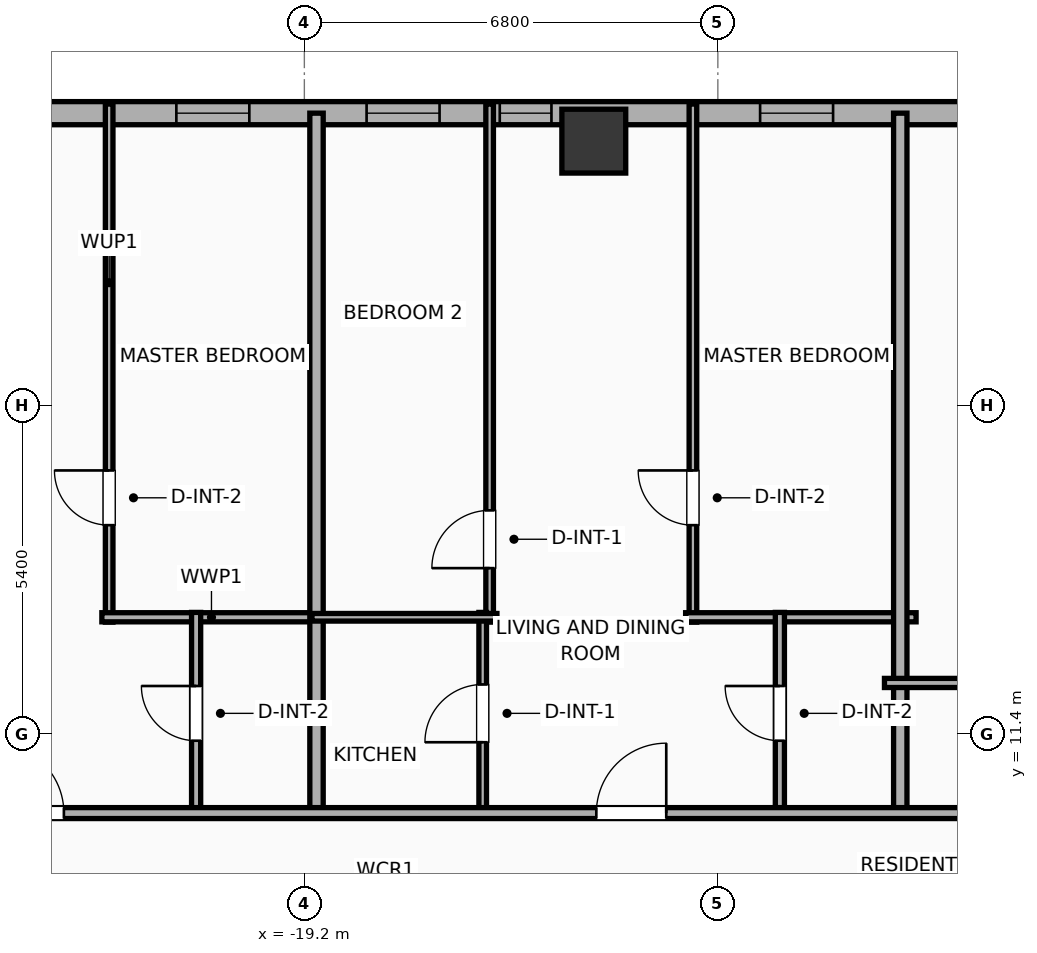
"""IFC4 building model, lengths in metres.
Left out: names, types, materials, properties, quantities, classifications, styles, units other than length and angle.
Written with IfcOpenShell. Run it as: python <this file> out.ifc"""

import sys

from ifc_helpers import new_model, si_unit, direction, frame, frame_2d, origin, origin_2d, place, context, subcontext, project, spatial, rectangle, hollow_rectangle, extrude, element, fill, save


model = new_model("IFC4")
c1 = context("Model", 3, precision=1e-05, world=origin(), true_north=direction((0.0, 1.0)))
c2 = subcontext(c1, "Body", "Model", "MODEL_VIEW")
j1 = project(units=[si_unit("LENGTHUNIT", "METRE"), si_unit("PLANEANGLEUNIT", "RADIAN")], contexts=[c1])
p1 = place(None, origin())
s1 = spatial("IfcSite", under=j1, at=p1, CompositionType="ELEMENT")
p2 = place(p1, origin())
s2 = spatial("IfcBuilding", under=s1, at=p2, CompositionType="ELEMENT")
p3 = place(p2, frame((0.0, 0.0, 97.5)))
s3 = spatial("IfcBuildingStorey", under=s2, at=p3, CompositionType="ELEMENT", Elevation=97.5)
p4 = place(p3, frame((-14.44, 21.15, 0.0), z_axis=(0.0, 0.0, 1.0), x_axis=(1.0, 0.0, 0.0)))
e1 = element("IfcColumn", 1, at=p4, inside=s3, PredefinedType="COLUMN", context=c2, shape_type="SweptSolid", body=[
    extrude(hollow_rectangle(XDim=1.05, YDim=1.05, WallThickness=0.036, at=origin_2d()), origin(), (0.0, 0.0, 1.0), 3.9),
])
p5 = place(p3, frame((-25.381, 21.61, 0.0), z_axis=(0.0, 0.0, 1.0), x_axis=(1.0, 0.0, 0.0)))
e2 = element("IfcWall", 2, at=p5, inside=s3, PredefinedType="ELEMENTEDWALL", context=c2, shape_type="SweptSolid", body=[
    extrude(rectangle(XDim=54.763, YDim=0.38, at=frame_2d((27.381, 0.0))), origin(), (0.0, 0.0, 1.0), 3.65),
])
p6 = place(p5, frame((45.067, 0.0, 0.75)))
e3 = element("IfcOpeningElement", 3, at=p6, cuts=e2, PredefinedType="OPENING", context=c2, shape_type="SweptSolid", body=[
    extrude(rectangle(XDim=2.4, YDim=2.1, at=frame_2d((1.2, 1.05))), frame((0.0, 0.2, 0.0), z_axis=(0.0, -1.0, 0.0), x_axis=(1.0, 0.0, 0.0)), (0.0, 0.0, 1.0), 0.4),
])
p7 = place(p5, frame((4.076, 0.0, 0.75)))
e4 = element("IfcOpeningElement", 4, at=p7, cuts=e2, PredefinedType="OPENING", context=c2, shape_type="SweptSolid", body=[
    extrude(rectangle(XDim=1.2, YDim=2.05, at=frame_2d((0.6, 1.025))), frame((0.0, 0.2, 0.0), z_axis=(0.0, -1.0, 0.0), x_axis=(1.0, 0.0, 0.0)), (0.0, 0.0, 1.0), 0.4),
])
p8 = place(p5, frame((9.395, 0.0, 0.75)))
e5 = element("IfcOpeningElement", 5, at=p8, cuts=e2, PredefinedType="OPENING", context=c2, shape_type="SweptSolid", body=[
    extrude(rectangle(XDim=0.85, YDim=2.05, at=frame_2d((0.425, 1.025))), frame((0.0, 0.2, 0.0), z_axis=(0.0, -1.0, 0.0), x_axis=(1.0, 0.0, 0.0)), (0.0, 0.0, 1.0), 0.4),
])
p9 = place(p5, frame((7.205, 0.0, 0.75)))
e6 = element("IfcOpeningElement", 6, at=p9, cuts=e2, PredefinedType="OPENING", context=c2, shape_type="SweptSolid", body=[
    extrude(rectangle(XDim=1.2, YDim=2.05, at=frame_2d((0.6, 1.025))), frame((0.0, 0.2, 0.0), z_axis=(0.0, -1.0, 0.0), x_axis=(1.0, 0.0, 0.0)), (0.0, 0.0, 1.0), 0.4),
])
p10 = place(p5, frame((13.676, 0.0, 0.75)))
e7 = element("IfcOpeningElement", 7, at=p10, cuts=e2, PredefinedType="OPENING", context=c2, shape_type="SweptSolid", body=[
    extrude(rectangle(XDim=1.2, YDim=2.05, at=frame_2d((0.6, 1.025))), frame((0.0, 0.2, 0.0), z_axis=(0.0, -1.0, 0.0), x_axis=(1.0, 0.0, 0.0)), (0.0, 0.0, 1.0), 0.4),
])
p11 = place(p5, frame((17.136, 0.0, 0.75)))
e8 = element("IfcOpeningElement", 8, at=p11, cuts=e2, PredefinedType="OPENING", context=c2, shape_type="SweptSolid", body=[
    extrude(rectangle(XDim=1.2, YDim=2.05, at=frame_2d((0.6, 1.025))), frame((0.0, 0.2, 0.0), z_axis=(0.0, -1.0, 0.0), x_axis=(1.0, 0.0, 0.0)), (0.0, 0.0, 1.0), 0.4),
])
p12 = place(p5, frame((22.656, 0.0, 0.75)))
e9 = element("IfcOpeningElement", 9, at=p12, cuts=e2, PredefinedType="OPENING", context=c2, shape_type="SweptSolid", body=[
    extrude(rectangle(XDim=1.2, YDim=2.05, at=frame_2d((0.6, 1.025))), frame((0.0, 0.2, 0.0), z_axis=(0.0, -1.0, 0.0), x_axis=(1.0, 0.0, 0.0)), (0.0, 0.0, 1.0), 0.4),
])
p13 = place(p5, frame((29.443, 0.0, 0.75)))
e10 = element("IfcOpeningElement", 10, at=p13, cuts=e2, PredefinedType="OPENING", context=c2, shape_type="SweptSolid", body=[
    extrude(rectangle(XDim=1.2, YDim=2.05, at=frame_2d((0.6, 1.025))), frame((0.0, 0.2, 0.0), z_axis=(0.0, -1.0, 0.0), x_axis=(1.0, 0.0, 0.0)), (0.0, 0.0, 1.0), 0.4),
])
p14 = place(p5, frame((26.348, 0.0, 0.75)))
e11 = element("IfcOpeningElement", 11, at=p14, cuts=e2, PredefinedType="OPENING", context=c2, shape_type="SweptSolid", body=[
    extrude(rectangle(XDim=1.2, YDim=2.05, at=frame_2d((0.6, 1.025))), frame((0.0, 0.2, 0.0), z_axis=(0.0, -1.0, 0.0), x_axis=(1.0, 0.0, 0.0)), (0.0, 0.0, 1.0), 0.4),
])
p15 = place(p5, frame((33.596, 0.0, 0.75)))
e12 = element("IfcOpeningElement", 12, at=p15, cuts=e2, PredefinedType="OPENING", context=c2, shape_type="SweptSolid", body=[
    extrude(rectangle(XDim=1.2, YDim=2.05, at=frame_2d((0.6, 1.025))), frame((0.0, 0.2, 0.0), z_axis=(0.0, -1.0, 0.0), x_axis=(1.0, 0.0, 0.0)), (0.0, 0.0, 1.0), 0.4),
])
p16 = place(p5, frame((36.014, 0.0, 0.75)))
e13 = element("IfcOpeningElement", 13, at=p16, cuts=e2, PredefinedType="OPENING", context=c2, shape_type="SweptSolid", body=[
    extrude(rectangle(XDim=1.2, YDim=2.05, at=frame_2d((0.6, 1.025))), frame((0.0, 0.2, 0.0), z_axis=(0.0, -1.0, 0.0), x_axis=(1.0, 0.0, 0.0)), (0.0, 0.0, 1.0), 0.4),
])
p17 = place(p5, frame((40.814, 0.0, 0.75)))
e14 = element("IfcOpeningElement", 14, at=p17, cuts=e2, PredefinedType="OPENING", context=c2, shape_type="SweptSolid", body=[
    extrude(rectangle(XDim=1.2, YDim=2.05, at=frame_2d((0.6, 1.025))), frame((0.0, 0.2, 0.0), z_axis=(0.0, -1.0, 0.0), x_axis=(1.0, 0.0, 0.0)), (0.0, 0.0, 1.0), 0.4),
])
p18 = place(p5, frame((49.385, 0.0, 0.75)))
e15 = element("IfcOpeningElement", 15, at=p18, cuts=e2, PredefinedType="OPENING", context=c2, shape_type="SweptSolid", body=[
    extrude(rectangle(XDim=1.2, YDim=2.05, at=frame_2d((0.6, 1.025))), frame((0.0, 0.2, 0.0), z_axis=(0.0, -1.0, 0.0), x_axis=(1.0, 0.0, 0.0)), (0.0, 0.0, 1.0), 0.4),
])
p19 = place(p5, frame((52.181, 0.0, 0.75)))
e16 = element("IfcOpeningElement", 16, at=p19, cuts=e2, PredefinedType="OPENING", context=c2, shape_type="SweptSolid", body=[
    extrude(rectangle(XDim=1.2, YDim=2.05, at=frame_2d((0.6, 1.025))), frame((0.0, 0.2, 0.0), z_axis=(0.0, -1.0, 0.0), x_axis=(1.0, 0.0, 0.0)), (0.0, 0.0, 1.0), 0.4),
])
p20 = place(p3, frame((-22.41, 13.24, 0.0), z_axis=(0.0, 0.0, 1.0), x_axis=(0.0, 1.0, 0.0)))
e17 = element("IfcWall", 17, at=p20, inside=s3, PredefinedType="PARTITIONING", context=c2, shape_type="SweptSolid", body=[
    extrude(rectangle(XDim=8.52, YDim=0.125, at=frame_2d((4.26, 0.0))), origin(), (0.0, 0.0, 1.0), 3.65),
])
p21 = place(p20, frame((1.595, 0.0, 0.0)))
e18 = element("IfcOpeningElement", 18, at=p21, cuts=e17, PredefinedType="OPENING", context=c2, shape_type="SweptSolid", body=[
    extrude(rectangle(XDim=0.9, YDim=2.05, at=frame_2d((0.45, 1.025))), frame((0.0, 0.073, 0.0), z_axis=(0.0, -1.0, 0.0), x_axis=(1.0, 0.0, 0.0)), (0.0, 0.0, 1.0), 0.145),
])
p22 = place(p3, frame((-22.53, 13.32, 0.0), z_axis=(0.0, 0.0, 1.0), x_axis=(1.0, 0.0, 0.0)))
e19 = element("IfcWall", 19, at=p22, inside=s3, PredefinedType="PLUMBINGWALL", context=c2, shape_type="SweptSolid", body=[
    extrude(rectangle(XDim=3.605, YDim=0.15, at=frame_2d((1.802, 0.0))), origin(), (0.0, 0.0, 1.0), 3.65),
])
p23 = place(p3, frame((-20.98, 10.08, 0.0), z_axis=(0.0, 0.0, 1.0), x_axis=(0.0, 1.0, 0.0)))
e20 = element("IfcWall", 20, at=p23, inside=s3, PredefinedType="PLUMBINGWALL", context=c2, shape_type="SweptSolid", body=[
    extrude(rectangle(XDim=3.32, YDim=0.15, at=frame_2d((1.66, 0.0))), origin(), (0.0, 0.0, 1.0), 3.65),
])
p24 = place(p23, frame((1.21, 0.0, 0.0)))
e21 = element("IfcOpeningElement", 21, at=p24, cuts=e20, PredefinedType="OPENING", context=c2, shape_type="SweptSolid", body=[
    extrude(rectangle(XDim=0.9, YDim=2.05, at=frame_2d((0.45, 1.025))), frame((0.0, 0.085, 0.0), z_axis=(0.0, -1.0, 0.0), x_axis=(1.0, 0.0, 0.0)), (0.0, 0.0, 1.0), 0.17),
])
p25 = place(p3, frame((-19.0, 10.02, 0.0), z_axis=(0.0, 0.0, 1.0), x_axis=(0.0, 1.0, 0.0)))
e22 = element("IfcWall", 22, at=p25, inside=s3, PredefinedType="PARTITIONING", context=c2, shape_type="SweptSolid", body=[
    extrude(rectangle(XDim=11.59, YDim=0.22, at=frame_2d((5.795, 0.0))), origin(), (0.0, 0.0, 1.0), 3.65),
])
p26 = place(p3, frame((-16.153, 13.24, 0.0), z_axis=(0.0, 0.0, 1.0), x_axis=(0.0, 1.0, 0.0)))
e23 = element("IfcWall", 23, at=p26, inside=s3, PredefinedType="PARTITIONING", context=c2, shape_type="SweptSolid", body=[
    extrude(rectangle(XDim=8.52, YDim=0.125, at=frame_2d((4.26, 0.0))), origin(), (0.0, 0.0, 1.0), 3.65),
])
p27 = place(p26, frame((0.888, 0.0, 0.0)))
e24 = element("IfcOpeningElement", 24, at=p27, cuts=e23, PredefinedType="OPENING", context=c2, shape_type="SweptSolid", body=[
    extrude(rectangle(XDim=0.95, YDim=2.05, at=frame_2d((0.475, 1.025))), frame((0.0, 0.073, 0.0), z_axis=(0.0, -1.0, 0.0), x_axis=(1.0, 0.0, 0.0)), (0.0, 0.0, 1.0), 0.145),
])
p28 = place(p3, frame((-12.81, 13.24, 0.0), z_axis=(0.0, 0.0, 1.0), x_axis=(0.0, 1.0, 0.0)))
e25 = element("IfcWall", 25, at=p28, inside=s3, PredefinedType="PARTITIONING", context=c2, shape_type="SweptSolid", body=[
    extrude(rectangle(XDim=8.52, YDim=0.125, at=frame_2d((4.26, 0.0))), origin(), (0.0, 0.0, 1.0), 3.65),
])
p29 = place(p28, frame((1.595, 0.0, 0.0)))
e26 = element("IfcOpeningElement", 26, at=p29, cuts=e25, PredefinedType="OPENING", context=c2, shape_type="SweptSolid", body=[
    extrude(rectangle(XDim=0.9, YDim=2.05, at=frame_2d((0.45, 1.025))), frame((0.0, 0.073, 0.0), z_axis=(0.0, -1.0, 0.0), x_axis=(1.0, 0.0, 0.0)), (0.0, 0.0, 1.0), 0.145),
])
p30 = place(p3, frame((-12.93, 13.32, 0.0), z_axis=(0.0, 0.0, 1.0), x_axis=(1.0, 0.0, 0.0)))
e27 = element("IfcWall", 27, at=p30, inside=s3, PredefinedType="PLUMBINGWALL", context=c2, shape_type="SweptSolid", body=[
    extrude(rectangle(XDim=3.79, YDim=0.15, at=frame_2d((1.895, 0.0))), origin(), (0.0, 0.0, 1.0), 3.65),
])
p31 = place(p3, frame((-16.267, 10.08, 0.0), z_axis=(0.0, 0.0, 1.0), x_axis=(0.0, 1.0, 0.0)))
e28 = element("IfcWall", 28, at=p31, inside=s3, PredefinedType="PARTITIONING", context=c2, shape_type="SweptSolid", body=[
    extrude(rectangle(XDim=3.32, YDim=0.125, at=frame_2d((1.66, 0.0))), origin(), (0.0, 0.0, 1.0), 3.65),
])
p32 = place(p31, frame((1.185, 0.0, 0.0)))
e29 = element("IfcOpeningElement", 29, at=p32, cuts=e28, PredefinedType="OPENING", context=c2, shape_type="SweptSolid", body=[
    extrude(rectangle(XDim=0.95, YDim=2.05, at=frame_2d((0.475, 1.025))), frame((0.0, 0.073, 0.0), z_axis=(0.0, -1.0, 0.0), x_axis=(1.0, 0.0, 0.0)), (0.0, 0.0, 1.0), 0.145),
])
p33 = place(p3, frame((-19.075, 13.32, 0.0), z_axis=(0.0, 0.0, 1.0), x_axis=(1.0, 0.0, 0.0)))
e30 = element("IfcWall", 30, at=p33, inside=s3, PredefinedType="PARTITIONING", context=c2, shape_type="SweptSolid", body=[
    extrude(rectangle(XDim=3.042, YDim=0.125, at=frame_2d((1.521, 0.0))), origin(), (0.0, 0.0, 1.0), 3.65),
])
p34 = place(p3, frame((-11.38, 10.08, 0.0), z_axis=(0.0, 0.0, 1.0), x_axis=(0.0, 1.0, 0.0)))
e31 = element("IfcWall", 31, at=p34, inside=s3, PredefinedType="PLUMBINGWALL", context=c2, shape_type="SweptSolid", body=[
    extrude(rectangle(XDim=3.32, YDim=0.15, at=frame_2d((1.66, 0.0))), origin(), (0.0, 0.0, 1.0), 3.65),
])
p35 = place(p34, frame((1.21, 0.0, 0.0)))
e32 = element("IfcOpeningElement", 32, at=p35, cuts=e31, PredefinedType="OPENING", context=c2, shape_type="SweptSolid", body=[
    extrude(rectangle(XDim=0.9, YDim=2.05, at=frame_2d((0.45, 1.025))), frame((0.0, 0.085, 0.0), z_axis=(0.0, -1.0, 0.0), x_axis=(1.0, 0.0, 0.0)), (0.0, 0.0, 1.0), 0.17),
])
p36 = place(p3, frame((-9.4, 10.02, 0.0), z_axis=(0.0, 0.0, 1.0), x_axis=(0.0, 1.0, 0.0)))
e33 = element("IfcWall", 33, at=p36, inside=s3, PredefinedType="PARTITIONING", context=c2, shape_type="SweptSolid", body=[
    extrude(rectangle(XDim=11.59, YDim=0.22, at=frame_2d((5.795, 0.0))), origin(), (0.0, 0.0, 1.0), 3.65),
])
p37 = place(p3, frame((-9.66, 12.24, 0.0), z_axis=(0.0, 0.0, 1.0), x_axis=(1.0, 0.0, 0.0)))
e34 = element("IfcWall", 34, at=p37, inside=s3, PredefinedType="PLUMBINGWALL", context=c2, shape_type="SweptSolid", body=[
    extrude(rectangle(XDim=3.85, YDim=0.15, at=frame_2d((1.925, 0.0))), origin(), (0.0, 0.0, 1.0), 3.65),
])
p38 = place(p3, frame((-29.21, 10.1, 0.0), z_axis=(0.0, 0.0, 1.0), x_axis=(1.0, 0.0, 0.0)))
e35 = element("IfcWall", 35, at=p38, inside=s3, PredefinedType="PARTITIONING", context=c2, shape_type="SweptSolid", body=[
    extrude(rectangle(XDim=62.42, YDim=0.18, at=frame_2d((31.21, 0.0))), origin(), (0.0, 0.0, 1.0), 3.65),
])
p39 = place(p38, frame((4.906, 0.0, 0.0)))
e36 = element("IfcOpeningElement", 36, at=p39, cuts=e35, PredefinedType="OPENING", context=c2, shape_type="SweptSolid", body=[
    extrude(rectangle(XDim=1.15, YDim=2.05, at=frame_2d((0.575, 1.025))), frame((0.0, 0.1, 0.0), z_axis=(0.0, -1.0, 0.0), x_axis=(1.0, 0.0, 0.0)), (0.0, 0.0, 1.0), 0.2),
])
p40 = place(p38, frame((14.812, 0.0, 0.0)))
e37 = element("IfcOpeningElement", 37, at=p40, cuts=e35, PredefinedType="OPENING", context=c2, shape_type="SweptSolid", body=[
    extrude(rectangle(XDim=1.15, YDim=2.05, at=frame_2d((0.575, 1.025))), frame((0.0, 0.1, 0.0), z_axis=(0.0, -1.0, 0.0), x_axis=(1.0, 0.0, 0.0)), (0.0, 0.0, 1.0), 0.2),
])
p41 = place(p38, frame((24.406, 0.0, 0.0)))
e38 = element("IfcOpeningElement", 38, at=p41, cuts=e35, PredefinedType="OPENING", context=c2, shape_type="SweptSolid", body=[
    extrude(rectangle(XDim=1.15, YDim=2.05, at=frame_2d((0.575, 1.025))), frame((0.0, 0.1, 0.0), z_axis=(0.0, -1.0, 0.0), x_axis=(1.0, 0.0, 0.0)), (0.0, 0.0, 1.0), 0.2),
])
p42 = place(p38, frame((33.981, 0.0, 0.0)))
e39 = element("IfcOpeningElement", 39, at=p42, cuts=e35, PredefinedType="OPENING", context=c2, shape_type="SweptSolid", body=[
    extrude(rectangle(XDim=1.15, YDim=2.05, at=frame_2d((0.575, 1.025))), frame((0.0, 0.1, 0.0), z_axis=(0.0, -1.0, 0.0), x_axis=(1.0, 0.0, 0.0)), (0.0, 0.0, 1.0), 0.2),
])
p43 = place(p38, frame((43.138, 0.0, 0.0)))
e40 = element("IfcOpeningElement", 40, at=p43, cuts=e35, PredefinedType="OPENING", context=c2, shape_type="SweptSolid", body=[
    extrude(rectangle(XDim=1.15, YDim=2.05, at=frame_2d((0.575, 1.025))), frame((0.0, 0.1, 0.0), z_axis=(0.0, -1.0, 0.0), x_axis=(1.0, 0.0, 0.0)), (0.0, 0.0, 1.0), 0.2),
])
p44 = place(p38, frame((51.777, 0.0, 0.0)))
e41 = element("IfcOpeningElement", 41, at=p44, cuts=e35, PredefinedType="OPENING", context=c2, shape_type="SweptSolid", body=[
    extrude(rectangle(XDim=0.9, YDim=2.05, at=frame_2d((0.45, 1.025))), frame((0.0, 0.1, 0.0), z_axis=(0.0, -1.0, 0.0), x_axis=(1.0, 0.0, 0.0)), (0.0, 0.0, 1.0), 0.2),
])
p45 = place(p38, frame((58.718, 0.0, 0.0)))
e42 = element("IfcOpeningElement", 42, at=p45, cuts=e35, PredefinedType="OPENING", context=c2, shape_type="SweptSolid", body=[
    extrude(rectangle(XDim=0.9, YDim=2.05, at=frame_2d((0.45, 1.025))), frame((0.0, 0.1, 0.0), z_axis=(0.0, -1.0, 0.0), x_axis=(1.0, 0.0, 0.0)), (0.0, 0.0, 1.0), 0.2),
])
p46 = place(p7, origin())
e43 = element("IfcWindow", 43, at=p46, inside=s3, PartitioningType="SINGLE_PANEL", PredefinedType="WINDOW", context=c2, shape_type="SweptSolid", body=[
    extrude(rectangle(XDim=1.2, YDim=2.05, at=frame_2d((0.6, 1.025))), frame((0.0, 0.03, 0.0), z_axis=(0.0, -1.0, 0.0), x_axis=(1.0, 0.0, 0.0)), (0.0, 0.0, 1.0), 0.06),
])
fill(e4, e43)
p47 = place(p8, origin())
e44 = element("IfcWindow", 44, at=p47, inside=s3, PartitioningType="SINGLE_PANEL", PredefinedType="WINDOW", context=c2, shape_type="SweptSolid", body=[
    extrude(rectangle(XDim=0.85, YDim=2.05, at=frame_2d((0.425, 1.025))), frame((0.0, 0.03, 0.0), z_axis=(0.0, -1.0, 0.0), x_axis=(1.0, 0.0, 0.0)), (0.0, 0.0, 1.0), 0.06),
])
fill(e5, e44)
p48 = place(p9, origin())
e45 = element("IfcWindow", 45, at=p48, inside=s3, PartitioningType="SINGLE_PANEL", PredefinedType="WINDOW", context=c2, shape_type="SweptSolid", body=[
    extrude(rectangle(XDim=1.2, YDim=2.05, at=frame_2d((0.6, 1.025))), frame((0.0, 0.03, 0.0), z_axis=(0.0, -1.0, 0.0), x_axis=(1.0, 0.0, 0.0)), (0.0, 0.0, 1.0), 0.06),
])
fill(e6, e45)
p49 = place(p10, origin())
e46 = element("IfcWindow", 46, at=p49, inside=s3, PartitioningType="SINGLE_PANEL", PredefinedType="WINDOW", context=c2, shape_type="SweptSolid", body=[
    extrude(rectangle(XDim=1.2, YDim=2.05, at=frame_2d((0.6, 1.025))), frame((0.0, 0.03, 0.0), z_axis=(0.0, -1.0, 0.0), x_axis=(1.0, 0.0, 0.0)), (0.0, 0.0, 1.0), 0.06),
])
fill(e7, e46)
p50 = place(p21, origin())
e47 = element("IfcDoor", 47, at=p50, inside=s3, OperationType="SINGLE_SWING_RIGHT", PredefinedType="DOOR", context=c2, shape_type="SweptSolid", body=[
    extrude(rectangle(XDim=0.9, YDim=2.05, at=frame_2d((0.45, 1.025))), frame((0.0, 0.025, 0.0), z_axis=(0.0, -1.0, 0.0), x_axis=(1.0, 0.0, 0.0)), (0.0, 0.0, 1.0), 0.05),
])
fill(e18, e47)
p51 = place(p24, origin())
e48 = element("IfcDoor", 48, at=p51, inside=s3, OperationType="SINGLE_SWING_RIGHT", PredefinedType="DOOR", context=c2, shape_type="SweptSolid", body=[
    extrude(rectangle(XDim=0.9, YDim=2.05, at=frame_2d((0.45, 1.025))), frame((0.0, 0.025, 0.0), z_axis=(0.0, -1.0, 0.0), x_axis=(1.0, 0.0, 0.0)), (0.0, 0.0, 1.0), 0.05),
])
fill(e21, e48)
p52 = place(p27, origin())
e49 = element("IfcDoor", 49, at=p52, inside=s3, OperationType="SINGLE_SWING_LEFT", PredefinedType="DOOR", context=c2, shape_type="SweptSolid", body=[
    extrude(rectangle(XDim=0.95, YDim=2.05, at=frame_2d((0.475, 1.025))), frame((0.0, 0.025, 0.0), z_axis=(0.0, -1.0, 0.0), x_axis=(1.0, 0.0, 0.0)), (0.0, 0.0, 1.0), 0.05),
])
fill(e24, e49)
p53 = place(p29, origin())
e50 = element("IfcDoor", 50, at=p53, inside=s3, OperationType="SINGLE_SWING_RIGHT", PredefinedType="DOOR", context=c2, shape_type="SweptSolid", body=[
    extrude(rectangle(XDim=0.9, YDim=2.05, at=frame_2d((0.45, 1.025))), frame((0.0, 0.025, 0.0), z_axis=(0.0, -1.0, 0.0), x_axis=(1.0, 0.0, 0.0)), (0.0, 0.0, 1.0), 0.05),
])
fill(e26, e50)
p54 = place(p32, origin())
e51 = element("IfcDoor", 51, at=p54, inside=s3, OperationType="SINGLE_SWING_LEFT", PredefinedType="DOOR", context=c2, shape_type="SweptSolid", body=[
    extrude(rectangle(XDim=0.95, YDim=2.05, at=frame_2d((0.475, 1.025))), frame((0.0, 0.025, 0.0), z_axis=(0.0, -1.0, 0.0), x_axis=(1.0, 0.0, 0.0)), (0.0, 0.0, 1.0), 0.05),
])
fill(e29, e51)
p55 = place(p35, origin())
e52 = element("IfcDoor", 52, at=p55, inside=s3, OperationType="SINGLE_SWING_RIGHT", PredefinedType="DOOR", context=c2, shape_type="SweptSolid", body=[
    extrude(rectangle(XDim=0.9, YDim=2.05, at=frame_2d((0.45, 1.025))), frame((0.0, 0.025, 0.0), z_axis=(0.0, -1.0, 0.0), x_axis=(1.0, 0.0, 0.0)), (0.0, 0.0, 1.0), 0.05),
])
fill(e32, e52)
p56 = place(p39, origin())
e53 = element("IfcDoor", 53, at=p56, inside=s3, OperationType="SINGLE_SWING_LEFT", PredefinedType="DOOR", context=c2, shape_type="SweptSolid", body=[
    extrude(rectangle(XDim=1.15, YDim=2.05, at=frame_2d((0.575, 1.025))), frame((0.0, 0.025, 0.0), z_axis=(0.0, -1.0, 0.0), x_axis=(1.0, 0.0, 0.0)), (0.0, 0.0, 1.0), 0.05),
])
fill(e36, e53)
p57 = place(p40, origin())
e54 = element("IfcDoor", 54, at=p57, inside=s3, OperationType="SINGLE_SWING_RIGHT", PredefinedType="DOOR", context=c2, shape_type="SweptSolid", body=[
    extrude(rectangle(XDim=1.15, YDim=2.05, at=frame_2d((0.575, 1.025))), frame((0.0, 0.025, 0.0), z_axis=(0.0, -1.0, 0.0), x_axis=(1.0, 0.0, 0.0)), (0.0, 0.0, 1.0), 0.05),
])
fill(e37, e54)
save(model, sys.argv[1])
